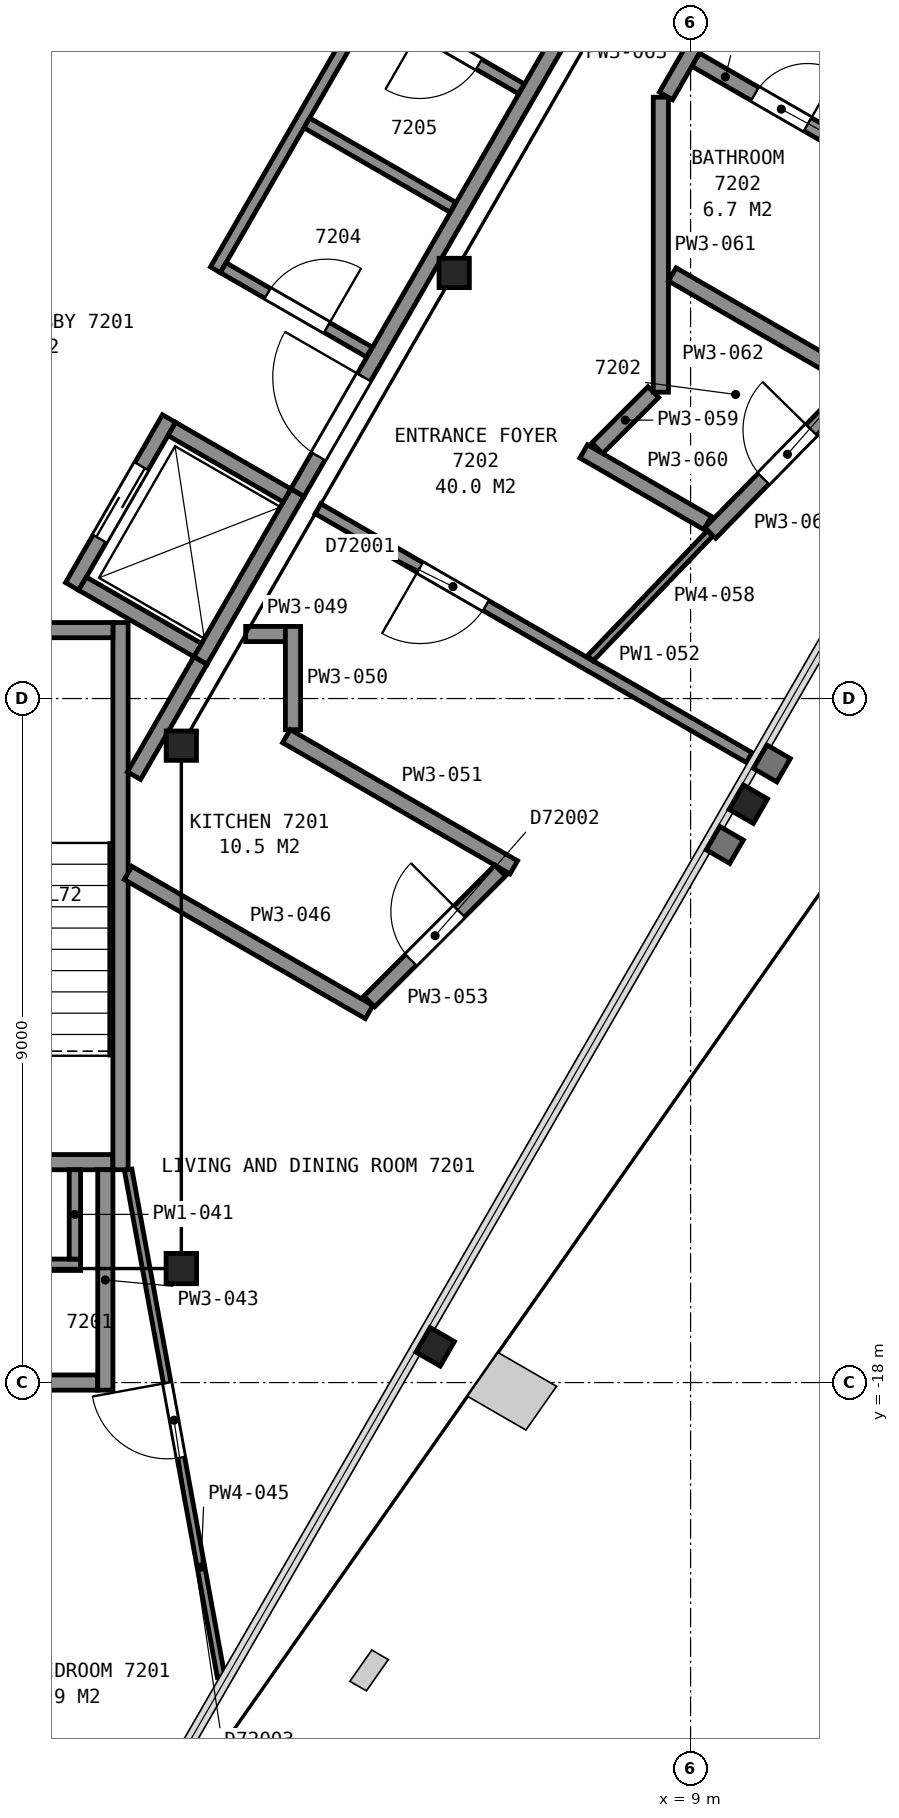
"""IFC4 building model, lengths in metres.
Left out: names, types, materials, properties, quantities, classifications, styles, units other than length and angle.
Written with IfcOpenShell. Run it as: python <this file> out.ifc"""

import sys

from ifc_helpers import new_model, si_unit, direction, frame, frame_2d, origin, origin_2d, place, context, subcontext, project, spatial, rectangle, i_section, extrude, element, fill, save


model = new_model("IFC4")
c1 = context("Model", 3, precision=1e-05, world=origin(), true_north=direction((0.0, 1.0)))
c2 = subcontext(c1, "Body", "Model", "MODEL_VIEW")
j1 = project(units=[si_unit("LENGTHUNIT", "METRE"), si_unit("PLANEANGLEUNIT", "RADIAN")], contexts=[c1])
p1 = place(None, origin())
s1 = spatial("IfcSite", under=j1, at=p1, CompositionType="ELEMENT")
p2 = place(p1, origin())
s2 = spatial("IfcBuilding", under=s1, at=p2, CompositionType="ELEMENT")
p3 = place(p2, frame((0.0, 0.0, 286.2)))
s3 = spatial("IfcBuildingStorey", under=s2, at=p3, CompositionType="ELEMENT", Elevation=286.2)
for number, where, z_axis, x_axis in (
    (1, (5.64, -17.53, 0.0), (0.0, 0.0, 1.0), (-0.5, -0.866, 0.0)),
    (2, (9.76, -10.39, 0.0), (0.0, 0.0, 1.0), (-0.5, -0.866, 0.0)),
):
    element("IfcColumn", number, at=place(p3, frame(where, z_axis=z_axis, x_axis=x_axis)), inside=s3, PredefinedType="COLUMN", context=c2, shape_type="SweptSolid", body=[
        extrude(i_section(OverallWidth=0.373, OverallDepth=0.368, WebThickness=0.015, FlangeThickness=0.024, FilletRadius=0.015, at=origin_2d()), origin(), (0.0, 0.0, 1.0), 3.7),
    ])
p4 = place(p3, frame((2.3, -16.5, 0.0), z_axis=(0.0, 0.0, 1.0), x_axis=(-1.0, 0.0, 0.0)))
e3 = element("IfcColumn", 3, at=p4, inside=s3, PredefinedType="COLUMN", context=c2, shape_type="SweptSolid", body=[
    extrude(i_section(OverallWidth=0.401, OverallDepth=0.399, WebThickness=0.025, FlangeThickness=0.04, FilletRadius=0.015, at=origin_2d()), origin(), (0.0, 0.0, 1.0), 3.7),
])
for number, where, z_axis, x_axis in (
    (4, (2.3, -9.62, 0.0), (0.0, 0.0, 1.0), (1.0, 0.0, 0.0)),
    (5, (5.89, -3.4, 0.0), (0.0, 0.0, 1.0), (1.0, 0.0, 0.0)),
):
    element("IfcColumn", number, at=place(p3, frame(where, z_axis=z_axis, x_axis=x_axis)), inside=s3, PredefinedType="COLUMN", context=c2, shape_type="SweptSolid", body=[
        extrude(i_section(OverallWidth=0.399, OverallDepth=0.386, WebThickness=0.021, FlangeThickness=0.033, FilletRadius=0.015, at=origin_2d()), origin(), (0.0, 0.0, 1.0), 3.7),
    ])
p5 = place(p3, frame((-1.4, -15.1, 0.0), z_axis=(0.0, 0.0, 1.0), x_axis=(1.0, 0.0, 0.0)))
e6 = element("IfcWall", 6, at=p5, inside=s3, PredefinedType="PARTITIONING", context=c2, shape_type="SweptSolid", body=[
    extrude(rectangle(XDim=2.8, YDim=0.2, at=frame_2d((1.4, 0.0))), origin(), (0.0, 0.0, 1.0), 3.45),
])
p6 = place(p5, frame((0.85, 0.0, 0.0)))
e7 = element("IfcOpeningElement", 7, at=p6, cuts=e6, PredefinedType="OPENING", context=c2, shape_type="SweptSolid", body=[
    extrude(rectangle(XDim=1.1, YDim=2.1, at=frame_2d((0.55, 1.05))), frame((0.0, 0.11, 0.0), z_axis=(0.0, -1.0, 0.0), x_axis=(1.0, 0.0, 0.0)), (0.0, 0.0, 1.0), 0.22),
])
p7 = place(p3, frame((1.5, -8.0, 0.0), z_axis=(0.0, 0.0, 1.0), x_axis=(0.0, -1.0, 0.0)))
e8 = element("IfcWall", 8, at=p7, inside=s3, PredefinedType="PARTITIONING", context=c2, shape_type="SweptSolid", body=[
    extrude(rectangle(XDim=7.2, YDim=0.2, at=frame_2d((3.6, 0.0))), origin(), (0.0, 0.0, 1.0), 3.45),
])
p8 = place(p3, frame((-1.4, -8.1, 0.0), z_axis=(0.0, 0.0, 1.0), x_axis=(1.0, 0.0, 0.0)))
e9 = element("IfcWall", 9, at=p8, inside=s3, PredefinedType="PARTITIONING", context=c2, shape_type="SweptSolid", body=[
    extrude(rectangle(XDim=2.8, YDim=0.2, at=frame_2d((1.4, 0.0))), origin(), (0.0, 0.0, 1.0), 3.45),
])
p9 = place(p3, frame((2.552, -8.5, 0.0), z_axis=(0.0, 0.0, 1.0), x_axis=(0.499990435942, 0.866030925526, 0.0)))
e10 = element("IfcWall", 10, at=p9, inside=s3, PredefinedType="PARTITIONING", context=c2, shape_type="SweptSolid", body=[
    extrude(rectangle(XDim=2.55, YDim=0.2, at=frame_2d((1.275, 0.0))), origin(), (0.0, 0.0, 1.0), 3.7),
])
p10 = place(p3, frame((0.863, -7.525, 0.0), z_axis=(0.0, 0.0, 1.0), x_axis=(0.499990435942, 0.866030925526, 0.0)))
e11 = element("IfcWall", 11, at=p10, inside=s3, PredefinedType="PARTITIONING", context=c2, shape_type="SweptSolid", body=[
    extrude(rectangle(XDim=2.55, YDim=0.2, at=frame_2d((1.275, 0.0))), origin(), (0.0, 0.0, 1.0), 3.7),
])
p11 = place(p10, frame((0.725, 0.0, 0.0)))
e12 = element("IfcOpeningElement", 12, at=p11, cuts=e11, PredefinedType="OPENING", context=c2, shape_type="SweptSolid", body=[
    extrude(rectangle(XDim=1.1, YDim=2.1, at=frame_2d((0.55, 1.05))), frame((0.0, 0.11, 0.0), z_axis=(0.0, -1.0, 0.0), x_axis=(1.0, 0.0, 0.0)), (0.0, 0.0, 1.0), 0.22),
])
for number, where, z_axis, x_axis in (
    (13, (3.69, -6.328, 0.0), (0.0, 0.0, 1.0), (-0.866, 0.5, 0.0)),
    (14, (2.515, -8.363, 0.0), (0.0, 0.0, 1.0), (-0.866, 0.5, 0.0)),
):
    element("IfcWall", number, at=place(p3, frame(where, z_axis=z_axis, x_axis=x_axis)), inside=s3, PredefinedType="PARTITIONING", context=c2, shape_type="SweptSolid", body=[
        extrude(rectangle(XDim=1.75, YDim=0.2, at=frame_2d((0.875, 0.0))), origin(), (0.0, 0.0, 1.0), 3.7),
    ])
p12 = place(p3, frame((1.677, -10.015, 0.0), z_axis=(0.0, 0.0, 1.0), x_axis=(0.49983532306, 0.866120459187, 0.0)))
e15 = element("IfcWall", 15, at=p12, inside=s3, PredefinedType="PARTITIONING", context=c2, shape_type="SweptSolid", body=[
    extrude(rectangle(XDim=1.748, YDim=0.2, at=frame_2d((0.874, 0.0))), origin(), (0.0, 0.0, 1.0), 3.45),
])
p13 = place(p3, frame((2.749, -3.359, 0.0), z_axis=(0.0, 0.0, 1.0), x_axis=(0.500017827812, 0.866015110648, 0.0)))
e16 = element("IfcWall", 16, at=p13, inside=s3, PredefinedType="PARTITIONING", context=c2, shape_type="SweptSolid", body=[
    extrude(rectangle(XDim=4.15, YDim=0.15, at=frame_2d((2.075, 0.0))), origin(), (0.0, 0.0, 1.0), 3.45),
])
p14 = place(p3, frame((2.851, -3.332, 0.0), z_axis=(0.0, 0.0, 1.0), x_axis=(0.866110524189, -0.499852538144, 0.0)))
e17 = element("IfcWall", 17, at=p14, inside=s3, PredefinedType="PARTITIONING", context=c2, shape_type="SweptSolid", body=[
    extrude(rectangle(XDim=2.22, YDim=0.15, at=frame_2d((1.11, 0.0))), origin(), (0.0, 0.0, 1.0), 3.45),
])
p15 = place(p14, frame((0.675, 0.0, 0.0)))
e18 = element("IfcOpeningElement", 18, at=p15, cuts=e17, PredefinedType="OPENING", context=c2, shape_type="SweptSolid", body=[
    extrude(rectangle(XDim=0.9, YDim=2.1, at=frame_2d((0.45, 1.05))), frame((0.0, 0.085, 0.0), z_axis=(0.0, -1.0, 0.0), x_axis=(1.0, 0.0, 0.0)), (0.0, 0.0, 1.0), 0.17),
])
p16 = place(p3, frame((3.828, -6.29, 0.0), z_axis=(0.0, 0.0, 1.0), x_axis=(0.499979739078, 0.866037101117, 0.0)))
e19 = element("IfcWall", 19, at=p16, inside=s3, PredefinedType="PARTITIONING", context=c2, shape_type="SweptSolid", body=[
    extrude(rectangle(XDim=11.363, YDim=0.2, at=frame_2d((5.681, 0.0))), origin(), (0.0, 0.0, 1.0), 3.45),
])
p17 = place(p16, frame((0.55, 0.0, 0.0)))
e20 = element("IfcOpeningElement", 20, at=p17, cuts=e19, PredefinedType="OPENING", context=c2, shape_type="SweptSolid", body=[
    extrude(rectangle(XDim=1.2, YDim=2.1, at=frame_2d((0.6, 1.05))), frame((0.0, 0.11, 0.0), z_axis=(0.0, -1.0, 0.0), x_axis=(1.0, 0.0, 0.0)), (0.0, 0.0, 1.0), 0.22),
])
p18 = place(p3, frame((3.951, -1.427, 0.0), z_axis=(0.0, 0.0, 1.0), x_axis=(0.866062920605, -0.499935013329, 0.0)))
e21 = element("IfcWall", 21, at=p18, inside=s3, PredefinedType="PARTITIONING", context=c2, shape_type="SweptSolid", body=[
    extrude(rectangle(XDim=2.22, YDim=0.15, at=frame_2d((1.11, 0.0))), origin(), (0.0, 0.0, 1.0), 3.45),
])
p19 = place(p3, frame((6.774, -0.978, 0.0), z_axis=(0.0, 0.0, 1.0), x_axis=(-0.866062920605, 0.499935013329, 0.0)))
e22 = element("IfcWall", 22, at=p19, inside=s3, PredefinedType="PARTITIONING", context=c2, shape_type="SweptSolid", body=[
    extrude(rectangle(XDim=2.22, YDim=0.15, at=frame_2d((1.11, 0.0))), origin(), (0.0, 0.0, 1.0), 3.45),
])
p20 = place(p19, frame((0.646, 0.0, 0.0)))
e23 = element("IfcOpeningElement", 23, at=p20, cuts=e22, PredefinedType="OPENING", context=c2, shape_type="SweptSolid", body=[
    extrude(rectangle(XDim=0.9, YDim=2.1, at=frame_2d((0.45, 1.05))), frame((0.0, 0.085, 0.0), z_axis=(0.0, -1.0, 0.0), x_axis=(1.0, 0.0, 0.0)), (0.0, 0.0, 1.0), 0.17),
])
p21 = place(p3, frame((-1.65, -16.45, 0.0), z_axis=(0.0, 0.0, 1.0), x_axis=(1.0, 0.0, 0.0)))
e24 = element("IfcWall", 24, at=p21, inside=s3, PredefinedType="PARTITIONING", context=c2, shape_type="SweptSolid", body=[
    extrude(rectangle(XDim=2.625, YDim=0.15, at=frame_2d((1.312, 0.0))), origin(), (0.0, 0.0, 1.0), 2.723),
])
p22 = place(p3, frame((-1.211, -18.0, 0.0), z_axis=(0.0, 0.0, 1.0), x_axis=(1.0, 0.0, 0.0)))
e25 = element("IfcWall", 25, at=p22, inside=s3, PredefinedType="PARTITIONING", context=c2, shape_type="SweptSolid", body=[
    extrude(rectangle(XDim=2.411, YDim=0.2, at=frame_2d((1.206, 0.0))), origin(), (0.0, 0.0, 1.0), 2.723),
])
p23 = place(p22, frame((0.825, 0.0, 0.0)))
e26 = element("IfcOpeningElement", 26, at=p23, cuts=e25, PredefinedType="OPENING", context=c2, shape_type="SweptSolid", body=[
    extrude(rectangle(XDim=0.8, YDim=2.1, at=frame_2d((0.4, 1.05))), frame((0.0, 0.11, 0.0), z_axis=(0.0, -1.0, 0.0), x_axis=(1.0, 0.0, 0.0)), (0.0, 0.0, 1.0), 0.22),
])
p24 = place(p3, frame((0.9, -16.375, 0.0), z_axis=(0.0, 0.0, 1.0), x_axis=(0.0, 1.0, 0.0)))
e27 = element("IfcWall", 27, at=p24, inside=s3, PredefinedType="PARTITIONING", context=c2, shape_type="SweptSolid", body=[
    extrude(rectangle(XDim=1.175, YDim=0.15, at=frame_2d((0.587, 0.0))), origin(), (0.0, 0.0, 1.0), 2.723),
])
p25 = place(p3, frame((1.3, -18.1, 0.0), z_axis=(0.0, 0.0, 1.0), x_axis=(0.0, 1.0, 0.0)))
e28 = element("IfcWall", 28, at=p25, inside=s3, PredefinedType="PARTITIONING", context=c2, shape_type="SweptSolid", body=[
    extrude(rectangle(XDim=2.9, YDim=0.2, at=frame_2d((1.45, 0.0))), origin(), (0.0, 0.0, 1.0), 2.723),
])
p26 = place(p3, frame((2.823, -21.869, 0.0), z_axis=(0.0, 0.0, 1.0), x_axis=(-0.180317418333, 0.983608473248, 0.0)))
e29 = element("IfcWall", 29, at=p26, inside=s3, PredefinedType="PARTITIONING", context=c2, shape_type="SweptSolid", body=[
    extrude(rectangle(XDim=6.781, YDim=0.1, at=frame_2d((3.39, 0.0))), origin(), (0.0, 0.0, 1.0), 2.723),
])
p27 = place(p26, frame((2.931, 0.0, 0.0)))
e30 = element("IfcOpeningElement", 30, at=p27, cuts=e29, PredefinedType="OPENING", context=c2, shape_type="SweptSolid", body=[
    extrude(rectangle(XDim=1.0, YDim=2.1, at=frame_2d((0.5, 1.05))), frame((0.0, 0.06, 0.0), z_axis=(0.0, -1.0, 0.0), x_axis=(1.0, 0.0, 0.0)), (0.0, 0.0, 1.0), 0.12),
])
p28 = place(p3, frame((1.6, -11.295, 0.0), z_axis=(0.0, 0.0, 1.0), x_axis=(0.866067869506, -0.499926439998, 0.0)))
e31 = element("IfcWall", 31, at=p28, inside=s3, PredefinedType="PARTITIONING", context=c2, shape_type="SweptSolid", body=[
    extrude(rectangle(XDim=3.661, YDim=0.2, at=frame_2d((1.83, 0.0))), origin(), (0.0, 0.0, 1.0), 2.723),
])
p29 = place(p3, frame((3.146, -8.151, 0.0), z_axis=(0.0, 0.0, 1.0), x_axis=(1.0, 0.0, 0.0)))
e32 = element("IfcWall", 32, at=p29, inside=s3, PredefinedType="PARTITIONING", context=c2, shape_type="SweptSolid", body=[
    extrude(rectangle(XDim=0.523, YDim=0.2, at=frame_2d((0.261, 0.0))), origin(), (0.0, 0.0, 1.0), 2.723),
])
p30 = place(p3, frame((3.769, -9.41, 0.0), z_axis=(0.0, 0.0, 1.0), x_axis=(0.0, 1.0, 0.0)))
e33 = element("IfcWall", 33, at=p30, inside=s3, PredefinedType="PARTITIONING", context=c2, shape_type="SweptSolid", body=[
    extrude(rectangle(XDim=1.359, YDim=0.2, at=frame_2d((0.679, 0.0))), origin(), (0.0, 0.0, 1.0), 2.723),
])
p31 = place(p3, frame((3.682, -9.495, 0.0), z_axis=(0.0, 0.0, 1.0), x_axis=(0.866046690806, -0.499963127985, 0.0)))
e34 = element("IfcWall", 34, at=p31, inside=s3, PredefinedType="PARTITIONING", context=c2, shape_type="SweptSolid", body=[
    extrude(rectangle(XDim=3.454, YDim=0.2, at=frame_2d((1.727, 0.0))), origin(), (0.0, 0.0, 1.0), 2.723),
])
p32 = place(p3, frame((9.772, -9.777, 0.0), z_axis=(0.0, 0.0, 1.0), x_axis=(-0.866083818164, 0.499898809675, 0.0)))
e35 = element("IfcWall", 35, at=p32, inside=s3, PredefinedType="PARTITIONING", context=c2, shape_type="SweptSolid", body=[
    extrude(rectangle(XDim=6.551, YDim=0.15, at=frame_2d((3.275, 0.0))), origin(), (0.0, 0.0, 1.0), 2.723),
])
p33 = place(p32, frame((4.001, 0.0, 0.0)))
e36 = element("IfcOpeningElement", 36, at=p33, cuts=e35, PredefinedType="OPENING", context=c2, shape_type="SweptSolid", body=[
    extrude(rectangle(XDim=1.0, YDim=2.1, at=frame_2d((0.5, 1.05))), frame((0.0, 0.085, 0.0), z_axis=(0.0, -1.0, 0.0), x_axis=(1.0, 0.0, 0.0)), (0.0, 0.0, 1.0), 0.17),
])
p34 = place(p3, frame((4.772, -12.987, 0.0), z_axis=(0.0, 0.0, 1.0), x_axis=(0.707106781187, 0.707106781187, 0.0)))
e37 = element("IfcWall", 37, at=p34, inside=s3, PredefinedType="PARTITIONING", context=c2, shape_type="SweptSolid", body=[
    extrude(rectangle(XDim=2.436, YDim=0.2, at=frame_2d((1.218, 0.0))), origin(), (0.0, 0.0, 1.0), 2.723),
])
p35 = place(p34, frame((0.775, 0.0, 0.0)))
e38 = element("IfcOpeningElement", 38, at=p35, cuts=e37, PredefinedType="OPENING", context=c2, shape_type="SweptSolid", body=[
    extrude(rectangle(XDim=0.9, YDim=2.1, at=frame_2d((0.45, 1.05))), frame((0.0, 0.11, 0.0), z_axis=(0.0, -1.0, 0.0), x_axis=(1.0, 0.0, 0.0)), (0.0, 0.0, 1.0), 0.22),
])
p36 = place(p3, frame((7.681, -8.47, 0.0), z_axis=(0.0, 0.0, 1.0), x_axis=(0.691774963189, 0.722113149239, 0.0)))
e39 = element("IfcWall", 39, at=p36, inside=s3, PredefinedType="PARTITIONING", context=c2, shape_type="SweptSolid", body=[
    extrude(rectangle(XDim=2.277, YDim=0.1, at=frame_2d((1.139, 0.0))), origin(), (0.0, 0.0, 1.0), 2.723),
])
p37 = place(p3, frame((7.772, -5.706, 0.0), z_axis=(0.0, 0.0, 1.0), x_axis=(0.707106781187, 0.707106781187, 0.0)))
e40 = element("IfcWall", 40, at=p37, inside=s3, PredefinedType="PARTITIONING", context=c2, shape_type="SweptSolid", body=[
    extrude(rectangle(XDim=1.044, YDim=0.2, at=frame_2d((0.522, 0.0))), origin(), (0.0, 0.0, 1.0), 2.723),
])
p38 = place(p3, frame((7.594, -5.748, 0.0), z_axis=(0.0, 0.0, 1.0), x_axis=(0.866049635583, -0.499958026946, 0.0)))
e41 = element("IfcWall", 41, at=p38, inside=s3, PredefinedType="PARTITIONING", context=c2, shape_type="SweptSolid", body=[
    extrude(rectangle(XDim=1.884, YDim=0.2, at=frame_2d((0.942, 0.0))), origin(), (0.0, 0.0, 1.0), 2.723),
])
p39 = place(p3, frame((8.609, -4.969, 0.0), z_axis=(0.0, 0.0, 1.0), x_axis=(0.0, 1.0, 0.0)))
e42 = element("IfcWall", 42, at=p39, inside=s3, PredefinedType="PARTITIONING", context=c2, shape_type="SweptSolid", body=[
    extrude(rectangle(XDim=3.881, YDim=0.2, at=frame_2d((1.94, 0.0))), origin(), (0.0, 0.0, 1.0), 2.723),
])
p40 = place(p3, frame((8.759, -3.42, 0.0), z_axis=(0.0, 0.0, 1.0), x_axis=(0.866098885879, -0.499872703674, 0.0)))
e43 = element("IfcWall", 43, at=p40, inside=s3, PredefinedType="PARTITIONING", context=c2, shape_type="SweptSolid", body=[
    extrude(rectangle(XDim=2.813, YDim=0.2, at=frame_2d((1.407, 0.0))), origin(), (0.0, 0.0, 1.0), 2.723),
])
p41 = place(p3, frame((8.677, -1.071, 0.0), z_axis=(0.0, 0.0, 1.0), x_axis=(0.49993245451, 0.866064397679, 0.0)))
e44 = element("IfcWall", 44, at=p41, inside=s3, PredefinedType="PARTITIONING", context=c2, shape_type="SweptSolid", body=[
    extrude(rectangle(XDim=1.308, YDim=0.2, at=frame_2d((0.654, 0.0))), origin(), (0.0, 0.0, 1.0), 2.723),
])
p42 = place(p3, frame((11.292, -1.879, 0.0), z_axis=(0.0, 0.0, 1.0), x_axis=(-0.866123870273, 0.499829412243, 0.0)))
e45 = element("IfcWall", 45, at=p42, inside=s3, PredefinedType="PARTITIONING", context=c2, shape_type="SweptSolid", body=[
    extrude(rectangle(XDim=2.569, YDim=0.2, at=frame_2d((1.284, 0.0))), origin(), (0.0, 0.0, 1.0), 2.723),
])
p43 = place(p42, frame((0.869, 0.0, 0.0)))
e46 = element("IfcOpeningElement", 46, at=p43, cuts=e45, PredefinedType="OPENING", context=c2, shape_type="SweptSolid", body=[
    extrude(rectangle(XDim=0.8, YDim=2.1, at=frame_2d((0.4, 1.05))), frame((0.0, 0.11, 0.0), z_axis=(0.0, -1.0, 0.0), x_axis=(1.0, 0.0, 0.0)), (0.0, 0.0, 1.0), 0.22),
])
p44 = place(p3, frame((9.259, -6.821, 0.0), z_axis=(0.0, 0.0, 1.0), x_axis=(0.700360124324, 0.713789672282, 0.0)))
e47 = element("IfcWall", 47, at=p44, inside=s3, PredefinedType="PARTITIONING", context=c2, shape_type="SweptSolid", body=[
    extrude(rectangle(XDim=2.654, YDim=0.2, at=frame_2d((1.327, 0.0))), origin(), (0.0, 0.0, 1.0), 2.723),
])
p45 = place(p44, frame((1.0, 0.0, 0.0)))
e48 = element("IfcOpeningElement", 48, at=p45, cuts=e47, PredefinedType="OPENING", context=c2, shape_type="SweptSolid", body=[
    extrude(rectangle(XDim=0.9, YDim=2.1, at=frame_2d((0.45, 1.05))), frame((0.0, 0.11, 0.0), z_axis=(0.0, -1.0, 0.0), x_axis=(1.0, 0.0, 0.0)), (0.0, 0.0, 1.0), 0.22),
])
p46 = place(p11, origin())
e49 = element("IfcDoor", 49, at=p46, inside=s3, OperationType="SLIDING_TO_LEFT", PredefinedType="DOOR", context=c2, shape_type="SweptSolid", body=[
    extrude(rectangle(XDim=1.1, YDim=2.1, at=frame_2d((0.55, 1.05))), frame((0.0, 0.025, 0.0), z_axis=(0.0, -1.0, 0.0), x_axis=(1.0, 0.0, 0.0)), (0.0, 0.0, 1.0), 0.05),
])
fill(e12, e49)
p47 = place(p15, origin())
e50 = element("IfcDoor", 50, at=p47, inside=s3, OperationType="SINGLE_SWING_RIGHT", PredefinedType="DOOR", context=c2, shape_type="SweptSolid", body=[
    extrude(rectangle(XDim=0.9, YDim=2.1, at=frame_2d((0.45, 1.05))), frame((0.0, 0.025, 0.0), z_axis=(0.0, -1.0, 0.0), x_axis=(1.0, 0.0, 0.0)), (0.0, 0.0, 1.0), 0.05),
])
fill(e18, e50)
p48 = place(p17, origin())
e51 = element("IfcDoor", 51, at=p48, inside=s3, OperationType="SINGLE_SWING_RIGHT", PredefinedType="DOOR", context=c2, shape_type="SweptSolid", body=[
    extrude(rectangle(XDim=1.2, YDim=2.1, at=frame_2d((0.6, 1.05))), frame((0.0, 0.025, 0.0), z_axis=(0.0, -1.0, 0.0), x_axis=(1.0, 0.0, 0.0)), (0.0, 0.0, 1.0), 0.05),
])
fill(e20, e51)
p49 = place(p20, origin())
e52 = element("IfcDoor", 52, at=p49, inside=s3, OperationType="SINGLE_SWING_RIGHT", PredefinedType="DOOR", context=c2, shape_type="SweptSolid", body=[
    extrude(rectangle(XDim=0.9, YDim=2.1, at=frame_2d((0.45, 1.05))), frame((0.0, 0.025, 0.0), z_axis=(0.0, -1.0, 0.0), x_axis=(1.0, 0.0, 0.0)), (0.0, 0.0, 1.0), 0.05),
])
fill(e23, e52)
p50 = place(p27, origin())
e53 = element("IfcDoor", 53, at=p50, inside=s3, OperationType="SINGLE_SWING_RIGHT", PredefinedType="DOOR", context=c2, shape_type="SweptSolid", body=[
    extrude(rectangle(XDim=1.0, YDim=2.1, at=frame_2d((0.5, 1.05))), frame((0.0, 0.025, 0.0), z_axis=(0.0, -1.0, 0.0), x_axis=(1.0, 0.0, 0.0)), (0.0, 0.0, 1.0), 0.05),
])
fill(e30, e53)
p51 = place(p33, origin())
e54 = element("IfcDoor", 54, at=p51, inside=s3, OperationType="SINGLE_SWING_RIGHT", PredefinedType="DOOR", context=c2, shape_type="SweptSolid", body=[
    extrude(rectangle(XDim=1.0, YDim=2.1, at=frame_2d((0.5, 1.05))), frame((0.0, 0.025, 0.0), z_axis=(0.0, -1.0, 0.0), x_axis=(1.0, 0.0, 0.0)), (0.0, 0.0, 1.0), 0.05),
])
fill(e36, e54)
p52 = place(p35, origin())
e55 = element("IfcDoor", 55, at=p52, inside=s3, OperationType="SINGLE_SWING_RIGHT", PredefinedType="DOOR", context=c2, shape_type="SweptSolid", body=[
    extrude(rectangle(XDim=0.9, YDim=2.1, at=frame_2d((0.45, 1.05))), frame((0.0, 0.025, 0.0), z_axis=(0.0, -1.0, 0.0), x_axis=(1.0, 0.0, 0.0)), (0.0, 0.0, 1.0), 0.05),
])
fill(e38, e55)
p53 = place(p43, origin())
e56 = element("IfcDoor", 56, at=p53, inside=s3, OperationType="SINGLE_SWING_LEFT", PredefinedType="DOOR", context=c2, shape_type="SweptSolid", body=[
    extrude(rectangle(XDim=0.8, YDim=2.1, at=frame_2d((0.4, 1.05))), frame((0.0, 0.025, 0.0), z_axis=(0.0, -1.0, 0.0), x_axis=(1.0, 0.0, 0.0)), (0.0, 0.0, 1.0), 0.05),
])
fill(e46, e56)
p54 = place(p45, origin())
e57 = element("IfcDoor", 57, at=p54, inside=s3, OperationType="SINGLE_SWING_RIGHT", PredefinedType="DOOR", context=c2, shape_type="SweptSolid", body=[
    extrude(rectangle(XDim=0.9, YDim=2.1, at=frame_2d((0.45, 1.05))), frame((0.0, 0.025, 0.0), z_axis=(0.0, -1.0, 0.0), x_axis=(1.0, 0.0, 0.0)), (0.0, 0.0, 1.0), 0.05),
])
fill(e48, e57)
save(model, sys.argv[1])
